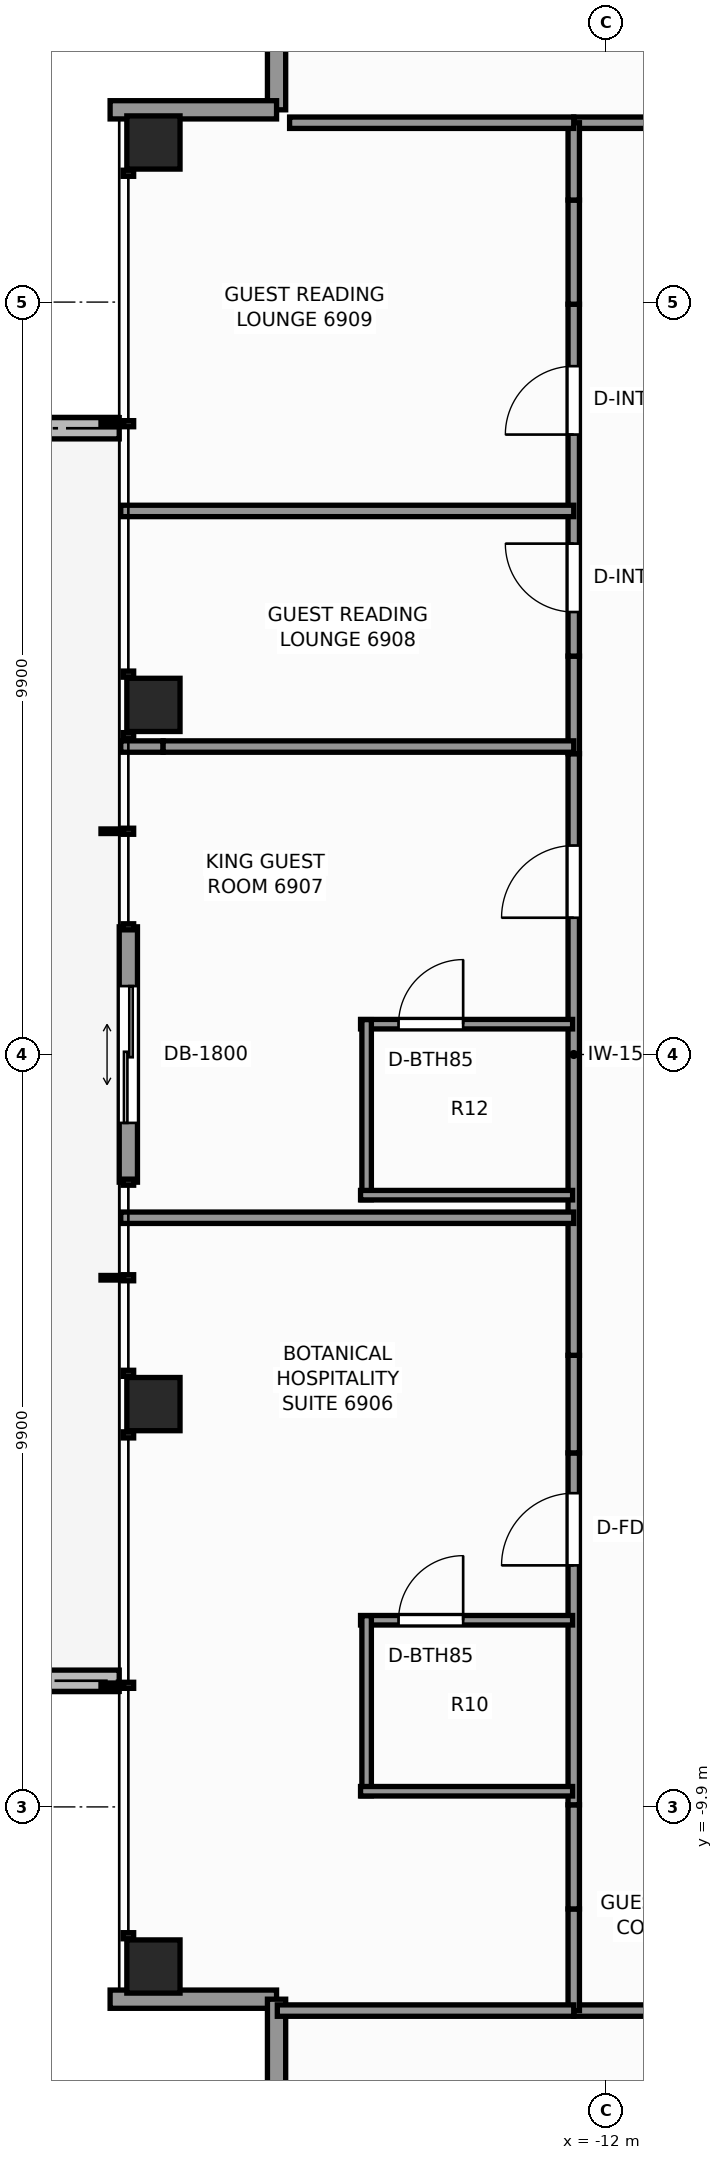
"""IFC4 building model, lengths in metres.
Left out: names, types, materials, properties, quantities, classifications, styles, units other than length and angle.
Written with IfcOpenShell. Run it as: python <this file> out.ifc"""

import sys

from ifc_helpers import new_model, si_unit, direction, frame, frame_2d, origin, origin_2d, place, context, subcontext, project, spatial, rectangle, extrude, element, fill, save


model = new_model("IFC4")
c1 = context("Model", 3, precision=1e-05, world=origin(), true_north=direction((0.0, 1.0)))
c2 = subcontext(c1, "Body", "Model", "MODEL_VIEW")
j1 = project(units=[si_unit("LENGTHUNIT", "METRE"), si_unit("PLANEANGLEUNIT", "RADIAN")], contexts=[c1])
p1 = place(None, origin())
s1 = spatial("IfcSite", under=j1, at=p1, CompositionType="ELEMENT")
p2 = place(p1, origin())
s2 = spatial("IfcBuilding", under=s1, at=p2, CompositionType="ELEMENT")
p3 = place(p2, frame((0.0, 0.0, 237.4)))
s3 = spatial("IfcBuildingStorey", under=s2, at=p3, CompositionType="ELEMENT", Elevation=237.4)
for number, where, z_axis, x_axis in (
    (1, (-17.95, -12.0, 0.0), (0.0, 0.0, 1.0), (1.0, 0.0, 0.0)),
    (2, (-17.95, -4.6, 0.0), (0.0, 0.0, 1.0), (1.0, 0.0, 0.0)),
    (3, (-17.95, 4.6, 0.0), (0.0, 0.0, 1.0), (1.0, 0.0, 0.0)),
    (4, (-17.95, 12.0, 0.0), (0.0, 0.0, 1.0), (1.0, 0.0, 0.0)),
):
    element("IfcColumn", number, at=place(p3, frame(where, z_axis=z_axis, x_axis=x_axis)), inside=s3, PredefinedType="COLUMN", context=c2, shape_type="SweptSolid", body=[
        extrude(rectangle(XDim=0.7, YDim=0.7, at=origin_2d()), origin(), (0.0, 0.0, 1.0), 3.5),
    ])
p4 = place(p3, frame((-20.406, -8.24, -0.07), z_axis=(0.0, 0.0, 1.0), x_axis=(1.0, 0.0, 0.0)))
e5 = element("IfcWall", 5, at=p4, inside=s3, PredefinedType="PARAPET", context=c2, shape_type="SweptSolid", body=[
    extrude(rectangle(XDim=2.006, YDim=0.28, at=frame_2d((1.003, 0.0))), origin(), (0.0, 0.0, 1.0), 0.42),
])
p5 = place(p3, frame((-18.4, 8.24, -0.07), z_axis=(0.0, 0.0, 1.0), x_axis=(-1.0, 0.0, 0.0)))
e6 = element("IfcWall", 6, at=p5, inside=s3, PredefinedType="PARAPET", context=c2, shape_type="SweptSolid", body=[
    extrude(rectangle(XDim=3.214, YDim=0.28, at=frame_2d((1.607, 0.0))), origin(), (0.0, 0.0, 1.0), 0.42),
])
p6 = place(p3, frame((-16.33, 12.43, 0.0), z_axis=(0.0, 0.0, 1.0), x_axis=(0.0, 1.0, 0.0)))
e7 = element("IfcWall", 7, at=p6, inside=s3, PredefinedType="STANDARD", context=c2, shape_type="SweptSolid", body=[
    extrude(rectangle(XDim=2.19, YDim=0.24, at=frame_2d((1.095, 0.0))), origin(), (0.0, 0.0, 1.0), 2.633),
])
p7 = place(p3, frame((-18.52, 12.43, 0.0), z_axis=(0.0, 0.0, 1.0), x_axis=(1.0, 0.0, 0.0)))
e8 = element("IfcWall", 8, at=p7, inside=s3, PredefinedType="STANDARD", context=c2, shape_type="SweptSolid", body=[
    extrude(rectangle(XDim=2.19, YDim=0.24, at=frame_2d((1.095, 0.0))), origin(), (0.0, 0.0, 1.0), 1.445),
])
p8 = place(p3, frame((-18.28, -1.68, 0.0), z_axis=(0.0, 0.0, 1.0), x_axis=(0.0, 1.0, 0.0)))
e9 = element("IfcWall", 9, at=p8, inside=s3, PredefinedType="STANDARD", context=c2, shape_type="SweptSolid", body=[
    extrude(rectangle(XDim=3.36, YDim=0.24, at=frame_2d((1.68, 0.0))), origin(), (0.0, 0.0, 1.0), 3.25),
])
p9 = place(p8, frame((0.78, 0.0, 0.0)))
e10 = element("IfcOpeningElement", 10, at=p9, cuts=e9, PredefinedType="OPENING", context=c2, shape_type="SweptSolid", body=[
    extrude(rectangle(XDim=1.8, YDim=2.2, at=frame_2d((0.9, 1.1))), frame((0.0, 0.13, 0.0), z_axis=(0.0, -1.0, 0.0), x_axis=(1.0, 0.0, 0.0)), (0.0, 0.0, 1.0), 0.26),
])
p10 = place(p3, frame((-16.33, -12.43, 0.0), z_axis=(0.0, 0.0, 1.0), x_axis=(-1.0, 0.0, 0.0)))
e11 = element("IfcWall", 11, at=p10, inside=s3, PredefinedType="STANDARD", context=c2, shape_type="SweptSolid", body=[
    extrude(rectangle(XDim=2.19, YDim=0.24, at=frame_2d((1.095, 0.0))), origin(), (0.0, 0.0, 1.0), 1.445),
])
p11 = place(p3, frame((-16.33, -14.62, 0.0), z_axis=(0.0, 0.0, 1.0), x_axis=(0.0, 1.0, 0.0)))
e12 = element("IfcWall", 12, at=p11, inside=s3, PredefinedType="STANDARD", context=c2, shape_type="SweptSolid", body=[
    extrude(rectangle(XDim=2.19, YDim=0.24, at=frame_2d((1.095, 0.0))), origin(), (0.0, 0.0, 1.0), 2.633),
])
p12 = place(p3, frame((-12.42, -12.58, 0.0), z_axis=(0.0, 0.0, 1.0), x_axis=(1.0, 0.0, 0.0)))
e13 = element("IfcWall", 13, at=p12, inside=s3, PredefinedType="PARTITIONING", context=c2, shape_type="SweptSolid", body=[
    extrude(rectangle(XDim=1.136, YDim=0.15, at=frame_2d((0.568, 0.0))), origin(), (0.0, 0.0, 1.0), 3.25),
])
p13 = place(p3, frame((-12.42, 12.26, 0.0), z_axis=(0.0, 0.0, 1.0), x_axis=(1.0, 0.0, 0.0)))
e14 = element("IfcWall", 14, at=p13, inside=s3, PredefinedType="PARTITIONING", context=c2, shape_type="SweptSolid", body=[
    extrude(rectangle(XDim=1.219, YDim=0.15, at=frame_2d((0.61, 0.0))), origin(), (0.0, 0.0, 1.0), 3.25),
])
p14 = place(p3, frame((-12.42, -12.58, 0.0), z_axis=(0.0, 0.0, 1.0), x_axis=(0.0, 1.0, 0.0)))
e15 = element("IfcWall", 15, at=p14, inside=s3, PredefinedType="PARTITIONING", context=c2, shape_type="SweptSolid", body=[
    extrude(rectangle(XDim=1.337, YDim=0.15, at=frame_2d((0.669, 0.0))), origin(), (0.0, 0.0, 1.0), 3.25),
])
p15 = place(p3, frame((-12.42, -11.243, 0.0), z_axis=(0.0, 0.0, 1.0), x_axis=(0.0, 1.0, 0.0)))
e16 = element("IfcWall", 16, at=p15, inside=s3, PredefinedType="PARTITIONING", context=c2, shape_type="SweptSolid", body=[
    extrude(rectangle(XDim=1.37, YDim=0.15, at=frame_2d((0.685, 0.0))), origin(), (0.0, 0.0, 1.0), 1.435),
])
p16 = place(p3, frame((-12.42, -9.872, 0.0), z_axis=(0.0, 0.0, 1.0), x_axis=(0.0, 1.0, 0.0)))
e17 = element("IfcWall", 17, at=p16, inside=s3, PredefinedType="PARTITIONING", context=c2, shape_type="SweptSolid", body=[
    extrude(rectangle(XDim=4.63, YDim=0.15, at=frame_2d((2.315, 0.0))), origin(), (0.0, 0.0, 1.0), 3.25),
])
p17 = place(p16, frame((3.15, 0.0, 0.0)))
e18 = element("IfcOpeningElement", 18, at=p17, cuts=e17, PredefinedType="OPENING", context=c2, shape_type="SweptSolid", body=[
    extrude(rectangle(XDim=0.95, YDim=2.06, at=frame_2d((0.475, 1.03))), frame((0.0, 0.085, 0.0), z_axis=(0.0, -1.0, 0.0), x_axis=(1.0, 0.0, 0.0)), (0.0, 0.0, 1.0), 0.17),
])
p18 = place(p3, frame((-12.42, -5.242, 0.0), z_axis=(0.0, 0.0, 1.0), x_axis=(0.0, 1.0, 0.0)))
e19 = element("IfcWall", 19, at=p18, inside=s3, PredefinedType="PARTITIONING", context=c2, shape_type="SweptSolid", body=[
    extrude(rectangle(XDim=1.284, YDim=0.15, at=frame_2d((0.642, 0.0))), origin(), (0.0, 0.0, 1.0), 1.435),
])
p19 = place(p3, frame((-12.42, -3.958, 0.0), z_axis=(0.0, 0.0, 1.0), x_axis=(0.0, 1.0, 0.0)))
e20 = element("IfcWall", 20, at=p19, inside=s3, PredefinedType="PARTITIONING", context=c2, shape_type="SweptSolid", body=[
    extrude(rectangle(XDim=7.916, YDim=0.15, at=frame_2d((3.958, 0.0))), origin(), (0.0, 0.0, 1.0), 2.539),
])
p20 = place(p19, frame((5.758, 0.0, 0.0)))
e21 = element("IfcOpeningElement", 21, at=p20, cuts=e20, PredefinedType="OPENING", context=c2, shape_type="SweptSolid", body=[
    extrude(rectangle(XDim=0.95, YDim=2.06, at=frame_2d((0.475, 1.03))), frame((0.0, 0.085, 0.0), z_axis=(0.0, -1.0, 0.0), x_axis=(1.0, 0.0, 0.0)), (0.0, 0.0, 1.0), 0.17),
])
p21 = place(p3, frame((-12.42, 3.958, 0.0), z_axis=(0.0, 0.0, 1.0), x_axis=(0.0, 1.0, 0.0)))
e22 = element("IfcWall", 22, at=p21, inside=s3, PredefinedType="PARTITIONING", context=c2, shape_type="SweptSolid", body=[
    extrude(rectangle(XDim=1.284, YDim=0.15, at=frame_2d((0.642, 0.0))), origin(), (0.0, 0.0, 1.0), 1.435),
])
p22 = place(p3, frame((-12.42, 5.242, 0.0), z_axis=(0.0, 0.0, 1.0), x_axis=(0.0, 1.0, 0.0)))
e23 = element("IfcWall", 23, at=p22, inside=s3, PredefinedType="PARTITIONING", context=c2, shape_type="SweptSolid", body=[
    extrude(rectangle(XDim=4.63, YDim=0.15, at=frame_2d((2.315, 0.0))), origin(), (0.0, 0.0, 1.0), 3.25),
])
p23 = place(p22, frame((0.58, 0.0, 0.0)))
e24 = element("IfcOpeningElement", 24, at=p23, cuts=e23, PredefinedType="OPENING", context=c2, shape_type="SweptSolid", body=[
    extrude(rectangle(XDim=0.9, YDim=2.06, at=frame_2d((0.45, 1.03))), frame((0.0, 0.085, 0.0), z_axis=(0.0, -1.0, 0.0), x_axis=(1.0, 0.0, 0.0)), (0.0, 0.0, 1.0), 0.17),
])
p24 = place(p22, frame((2.915, 0.0, 0.0)))
e25 = element("IfcOpeningElement", 25, at=p24, cuts=e23, PredefinedType="OPENING", context=c2, shape_type="SweptSolid", body=[
    extrude(rectangle(XDim=0.9, YDim=2.06, at=frame_2d((0.45, 1.03))), frame((0.0, 0.085, 0.0), z_axis=(0.0, -1.0, 0.0), x_axis=(1.0, 0.0, 0.0)), (0.0, 0.0, 1.0), 0.17),
])
p25 = place(p3, frame((-12.42, 9.872, 0.0), z_axis=(0.0, 0.0, 1.0), x_axis=(0.0, 1.0, 0.0)))
e26 = element("IfcWall", 26, at=p25, inside=s3, PredefinedType="PARTITIONING", context=c2, shape_type="SweptSolid", body=[
    extrude(rectangle(XDim=1.37, YDim=0.15, at=frame_2d((0.685, 0.0))), origin(), (0.0, 0.0, 1.0), 1.435),
])
p26 = place(p3, frame((-12.42, 11.243, 0.0), z_axis=(0.0, 0.0, 1.0), x_axis=(0.0, 1.0, 0.0)))
e27 = element("IfcWall", 27, at=p26, inside=s3, PredefinedType="PARTITIONING", context=c2, shape_type="SweptSolid", body=[
    extrude(rectangle(XDim=1.017, YDim=0.15, at=frame_2d((0.509, 0.0))), origin(), (0.0, 0.0, 1.0), 3.25),
])
p27 = place(p3, frame((-16.32, -12.58, 0.0), z_axis=(0.0, 0.0, 1.0), x_axis=(1.0, 0.0, 0.0)))
e28 = element("IfcWall", 28, at=p27, inside=s3, PredefinedType="PARTITIONING", context=c2, shape_type="SweptSolid", body=[
    extrude(rectangle(XDim=3.9, YDim=0.15, at=frame_2d((1.95, 0.0))), origin(), (0.0, 0.0, 1.0), 3.25),
])
p28 = place(p3, frame((-16.158, 12.26, 0.0), z_axis=(0.0, 0.0, 1.0), x_axis=(1.0, 0.0, 0.0)))
e29 = element("IfcWall", 29, at=p28, inside=s3, PredefinedType="PARTITIONING", context=c2, shape_type="SweptSolid", body=[
    extrude(rectangle(XDim=3.739, YDim=0.15, at=frame_2d((1.869, 0.0))), origin(), (0.0, 0.0, 1.0), 3.25),
])
p29 = place(p3, frame((-18.38, -2.148, 0.0), z_axis=(0.0, 0.0, 1.0), x_axis=(1.0, 0.0, 0.0)))
e30 = element("IfcWall", 30, at=p29, inside=s3, PredefinedType="PARTITIONING", context=c2, shape_type="SweptSolid", body=[
    extrude(rectangle(XDim=5.96, YDim=0.15, at=frame_2d((2.98, 0.0))), origin(), (0.0, 0.0, 1.0), 2.623),
])
p30 = place(p3, frame((-15.225, -7.444, 0.0), z_axis=(0.0, 0.0, 1.0), x_axis=(1.0, 0.0, 0.0)))
e31 = element("IfcWall", 31, at=p30, inside=s3, PredefinedType="PARTITIONING", context=c2, shape_type="SweptSolid", body=[
    extrude(rectangle(XDim=2.79, YDim=0.125, at=frame_2d((1.395, 0.0))), origin(), (0.0, 0.0, 1.0), 3.25),
])
p31 = place(p30, frame((0.5, 0.0, 0.0)))
e32 = element("IfcOpeningElement", 32, at=p31, cuts=e31, PredefinedType="OPENING", context=c2, shape_type="SweptSolid", body=[
    extrude(rectangle(XDim=0.85, YDim=2.03, at=frame_2d((0.425, 1.015))), frame((0.0, 0.073, 0.0), z_axis=(0.0, -1.0, 0.0), x_axis=(1.0, 0.0, 0.0)), (0.0, 0.0, 1.0), 0.145),
])
p32 = place(p3, frame((-15.145, -9.754, 0.0), z_axis=(0.0, 0.0, 1.0), x_axis=(0.0, 1.0, 0.0)))
e33 = element("IfcWall", 33, at=p32, inside=s3, PredefinedType="PARTITIONING", context=c2, shape_type="SweptSolid", body=[
    extrude(rectangle(XDim=2.37, YDim=0.125, at=frame_2d((1.185, 0.0))), origin(), (0.0, 0.0, 1.0), 3.25),
])
p33 = place(p3, frame((-15.225, -9.694, 0.0), z_axis=(0.0, 0.0, 1.0), x_axis=(1.0, 0.0, 0.0)))
e34 = element("IfcWall", 34, at=p33, inside=s3, PredefinedType="PARTITIONING", context=c2, shape_type="SweptSolid", body=[
    extrude(rectangle(XDim=2.79, YDim=0.125, at=frame_2d((1.395, 0.0))), origin(), (0.0, 0.0, 1.0), 3.25),
])
p34 = place(p3, frame((-18.38, 4.052, 0.0), z_axis=(0.0, 0.0, 1.0), x_axis=(1.0, 0.0, 0.0)))
e35 = element("IfcWall", 35, at=p34, inside=s3, PredefinedType="PARTITIONING", context=c2, shape_type="SweptSolid", body=[
    extrude(rectangle(XDim=0.557, YDim=0.15, at=frame_2d((0.279, 0.0))), origin(), (0.0, 0.0, 1.0), 2.623),
])
p35 = place(p3, frame((-17.823, 4.052, 0.0), z_axis=(0.0, 0.0, 1.0), x_axis=(1.0, 0.0, 0.0)))
e36 = element("IfcWall", 36, at=p35, inside=s3, PredefinedType="PARTITIONING", context=c2, shape_type="SweptSolid", body=[
    extrude(rectangle(XDim=5.403, YDim=0.15, at=frame_2d((2.701, 0.0))), origin(), (0.0, 0.0, 1.0), 1.435),
])
p36 = place(p3, frame((-15.225, 0.399, 0.0), z_axis=(0.0, 0.0, 1.0), x_axis=(1.0, 0.0, 0.0)))
e37 = element("IfcWall", 37, at=p36, inside=s3, PredefinedType="PARTITIONING", context=c2, shape_type="SweptSolid", body=[
    extrude(rectangle(XDim=2.79, YDim=0.125, at=frame_2d((1.395, 0.0))), origin(), (0.0, 0.0, 1.0), 3.25),
])
p37 = place(p36, frame((0.5, 0.0, 0.0)))
e38 = element("IfcOpeningElement", 38, at=p37, cuts=e37, PredefinedType="OPENING", context=c2, shape_type="SweptSolid", body=[
    extrude(rectangle(XDim=0.85, YDim=2.03, at=frame_2d((0.425, 1.015))), frame((0.0, 0.073, 0.0), z_axis=(0.0, -1.0, 0.0), x_axis=(1.0, 0.0, 0.0)), (0.0, 0.0, 1.0), 0.145),
])
p38 = place(p3, frame((-15.145, -1.911, 0.0), z_axis=(0.0, 0.0, 1.0), x_axis=(0.0, 1.0, 0.0)))
e39 = element("IfcWall", 39, at=p38, inside=s3, PredefinedType="PARTITIONING", context=c2, shape_type="SweptSolid", body=[
    extrude(rectangle(XDim=2.37, YDim=0.125, at=frame_2d((1.185, 0.0))), origin(), (0.0, 0.0, 1.0), 2.775),
])
p39 = place(p3, frame((-15.225, -1.851, 0.0), z_axis=(0.0, 0.0, 1.0), x_axis=(1.0, 0.0, 0.0)))
e40 = element("IfcWall", 40, at=p39, inside=s3, PredefinedType="PARTITIONING", context=c2, shape_type="SweptSolid", body=[
    extrude(rectangle(XDim=2.79, YDim=0.125, at=frame_2d((1.395, 0.0))), origin(), (0.0, 0.0, 1.0), 3.25),
])
p40 = place(p3, frame((-18.38, 7.152, 0.0), z_axis=(0.0, 0.0, 1.0), x_axis=(1.0, 0.0, 0.0)))
e41 = element("IfcWall", 41, at=p40, inside=s3, PredefinedType="PARTITIONING", context=c2, shape_type="SweptSolid", body=[
    extrude(rectangle(XDim=5.96, YDim=0.15, at=frame_2d((2.98, 0.0))), origin(), (0.0, 0.0, 1.0), 2.623),
])
p41 = place(p9, origin())
e42 = element("IfcDoor", 42, at=p41, inside=s3, OperationType="DOUBLE_DOOR_SLIDING", PredefinedType="DOOR", context=c2, shape_type="SweptSolid", body=[
    extrude(rectangle(XDim=1.8, YDim=2.2, at=frame_2d((0.9, 1.1))), frame((0.0, 0.025, 0.0), z_axis=(0.0, -1.0, 0.0), x_axis=(1.0, 0.0, 0.0)), (0.0, 0.0, 1.0), 0.05),
])
fill(e10, e42)
p42 = place(p31, origin())
e43 = element("IfcDoor", 43, at=p42, inside=s3, OperationType="SINGLE_SWING_RIGHT", PredefinedType="DOOR", context=c2, shape_type="SweptSolid", body=[
    extrude(rectangle(XDim=0.85, YDim=2.03, at=frame_2d((0.425, 1.015))), frame((0.0, 0.025, 0.0), z_axis=(0.0, -1.0, 0.0), x_axis=(1.0, 0.0, 0.0)), (0.0, 0.0, 1.0), 0.05),
])
fill(e32, e43)
p43 = place(p17, origin())
e44 = element("IfcDoor", 44, at=p43, inside=s3, OperationType="SINGLE_SWING_LEFT", PredefinedType="DOOR", context=c2, shape_type="SweptSolid", body=[
    extrude(rectangle(XDim=0.95, YDim=2.06, at=frame_2d((0.475, 1.03))), frame((0.0, 0.025, 0.0), z_axis=(0.0, -1.0, 0.0), x_axis=(1.0, 0.0, 0.0)), (0.0, 0.0, 1.0), 0.05),
])
fill(e18, e44)
p44 = place(p37, origin())
e45 = element("IfcDoor", 45, at=p44, inside=s3, OperationType="SINGLE_SWING_RIGHT", PredefinedType="DOOR", context=c2, shape_type="SweptSolid", body=[
    extrude(rectangle(XDim=0.85, YDim=2.03, at=frame_2d((0.425, 1.015))), frame((0.0, 0.025, 0.0), z_axis=(0.0, -1.0, 0.0), x_axis=(1.0, 0.0, 0.0)), (0.0, 0.0, 1.0), 0.05),
])
fill(e38, e45)
p45 = place(p20, origin())
e46 = element("IfcDoor", 46, at=p45, inside=s3, OperationType="SINGLE_SWING_LEFT", PredefinedType="DOOR", context=c2, shape_type="SweptSolid", body=[
    extrude(rectangle(XDim=0.95, YDim=2.06, at=frame_2d((0.475, 1.03))), frame((0.0, 0.025, 0.0), z_axis=(0.0, -1.0, 0.0), x_axis=(1.0, 0.0, 0.0)), (0.0, 0.0, 1.0), 0.05),
])
fill(e21, e46)
p46 = place(p23, origin())
e47 = element("IfcDoor", 47, at=p46, inside=s3, OperationType="SINGLE_SWING_RIGHT", PredefinedType="DOOR", context=c2, shape_type="SweptSolid", body=[
    extrude(rectangle(XDim=0.9, YDim=2.06, at=frame_2d((0.45, 1.03))), frame((0.0, 0.025, 0.0), z_axis=(0.0, -1.0, 0.0), x_axis=(1.0, 0.0, 0.0)), (0.0, 0.0, 1.0), 0.05),
])
fill(e24, e47)
p47 = place(p24, origin())
e48 = element("IfcDoor", 48, at=p47, inside=s3, OperationType="SINGLE_SWING_LEFT", PredefinedType="DOOR", context=c2, shape_type="SweptSolid", body=[
    extrude(rectangle(XDim=0.9, YDim=2.06, at=frame_2d((0.45, 1.03))), frame((0.0, 0.025, 0.0), z_axis=(0.0, -1.0, 0.0), x_axis=(1.0, 0.0, 0.0)), (0.0, 0.0, 1.0), 0.05),
])
fill(e25, e48)
save(model, sys.argv[1])
